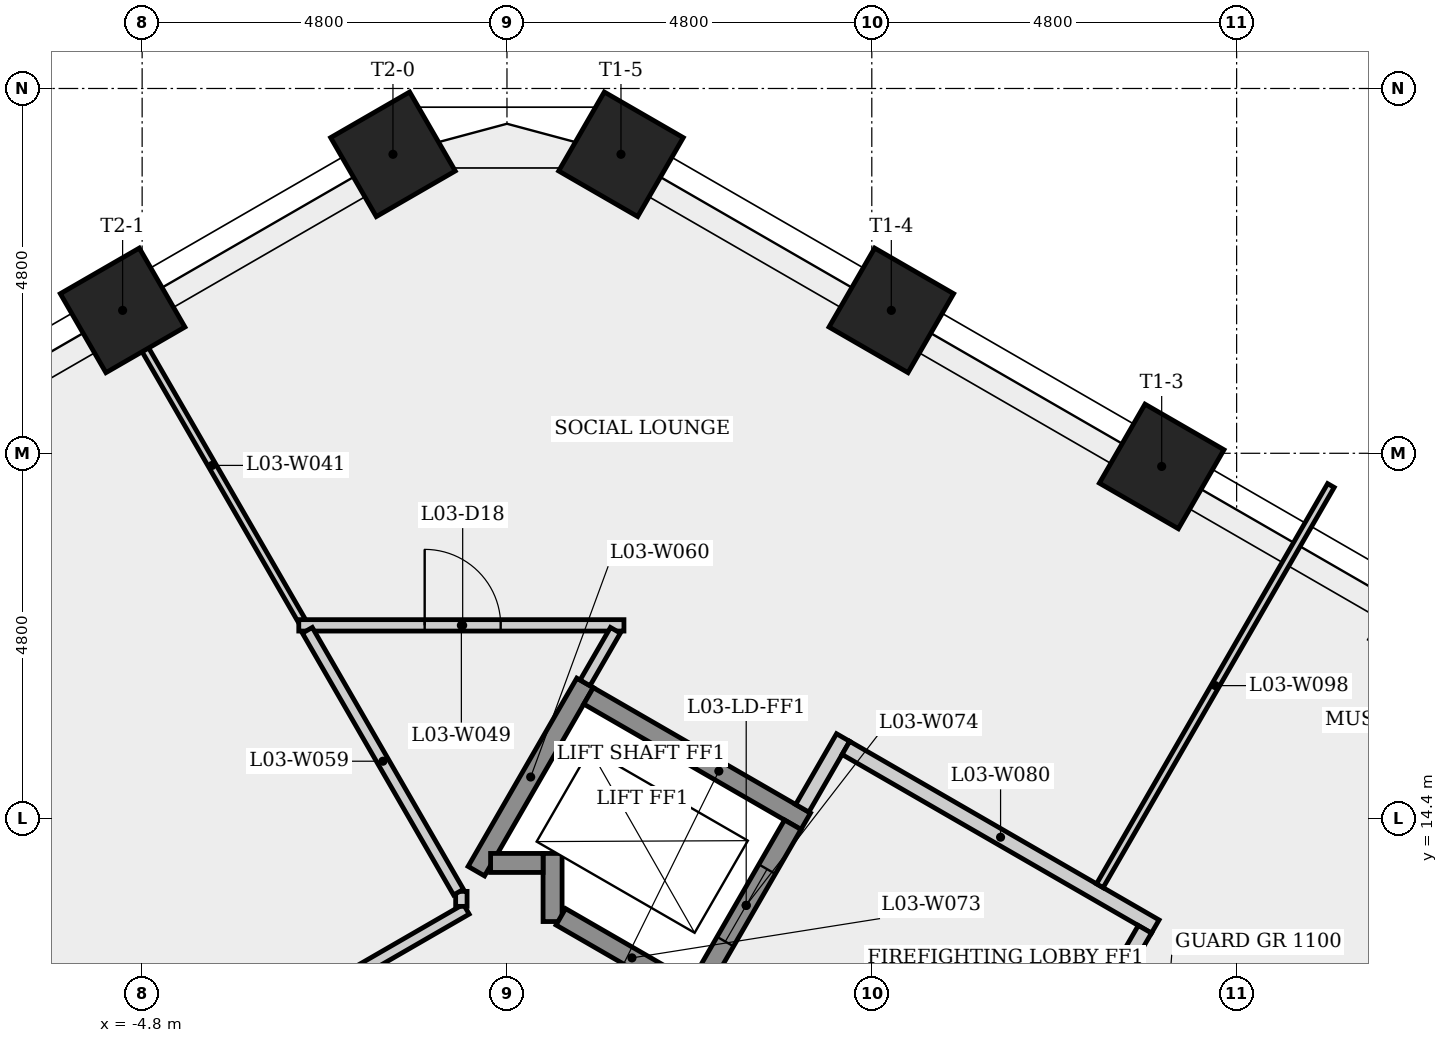
"""IFC4 building model, lengths in metres.
Left out: names, types, materials, properties, quantities, classifications, styles, units other than length and angle.
Written with IfcOpenShell. Run it as: python <this file> out.ifc"""

import sys

from ifc_helpers import new_model, si_unit, direction, frame, frame_2d, origin, origin_2d, place, context, subcontext, project, spatial, rectangle, extrude, element, fill, save


model = new_model("IFC4")
c1 = context("Model", 3, precision=1e-05, world=origin(), true_north=direction((0.0, 1.0)))
c2 = subcontext(c1, "Body", "Model", "MODEL_VIEW")
j1 = project(units=[si_unit("LENGTHUNIT", "METRE"), si_unit("PLANEANGLEUNIT", "RADIAN")], contexts=[c1])
p1 = place(None, origin())
s1 = spatial("IfcSite", under=j1, at=p1, CompositionType="ELEMENT")
p2 = place(p1, origin())
s2 = spatial("IfcBuilding", under=s1, at=p2, CompositionType="ELEMENT")
p3 = place(p2, frame((0.0, 0.0, 16.0)))
s3 = spatial("IfcBuildingStorey", under=s2, at=p3, CompositionType="ELEMENT", Elevation=16.0)
for number, where, z_axis, x_axis in (
    (1, (8.614, 19.027, 0.0), (0.0, 0.0, 1.0), (0.5, 0.866, 0.0)),
    (2, (5.057, 21.08, 0.0), (0.0, 0.0, 1.0), (0.5, 0.866, 0.0)),
    (3, (1.5, 23.134, 0.0), (0.0, 0.0, 1.0), (0.5, 0.866, 0.0)),
    (4, (-1.5, 23.134, 0.0), (0.0, 0.0, 1.0), (-0.5, 0.866, 0.0)),
    (5, (-5.057, 21.08, 0.0), (0.0, 0.0, 1.0), (-0.5, 0.866, 0.0)),
):
    element("IfcColumn", number, at=place(p3, frame(where, z_axis=z_axis, x_axis=x_axis)), inside=s3, PredefinedType="COLUMN", context=c2, shape_type="SweptSolid", body=[
        extrude(rectangle(XDim=1.2, YDim=1.2, at=origin_2d()), origin(), (0.0, 0.0, 1.0), 4.5),
    ])
p4 = place(p3, frame((-10.598, 7.391, 0.0), z_axis=(0.0, 0.0, 1.0), x_axis=(0.866022183431, 0.500005577774, 0.0)))
e6 = element("IfcWall", 6, at=p4, inside=s3, PredefinedType="PARTITIONING", context=c2, shape_type="SweptSolid", body=[
    extrude(rectangle(XDim=11.619, YDim=0.15, at=frame_2d((5.81, 0.0))), origin(), (0.0, 0.0, 1.0), 4.05),
])
p5 = place(p4, frame((5.272, 0.0, 0.0)))
e7 = element("IfcOpeningElement", 7, at=p5, cuts=e6, PredefinedType="OPENING", context=c2, shape_type="SweptSolid", body=[
    extrude(rectangle(XDim=1.0, YDim=2.1, at=frame_2d((0.5, 1.05))), frame((0.0, 0.085, 0.0), z_axis=(0.0, -1.0, 0.0), x_axis=(1.0, 0.0, 0.0)), (0.0, 0.0, 1.0), 0.17),
])
p6 = place(p3, frame((-5.057, 21.08, 0.0), z_axis=(0.0, 0.0, 1.0), x_axis=(0.500018540756, -0.866014699009, 0.0)))
e8 = element("IfcWall", 8, at=p6, inside=s3, PredefinedType="PARTITIONING", context=c2, shape_type="SweptSolid", body=[
    extrude(rectangle(XDim=4.711, YDim=0.1, at=frame_2d((2.355, 0.0))), origin(), (0.0, 0.0, 1.0), 4.05),
])
p7 = place(p3, frame((-2.739, 16.936, 0.0), z_axis=(0.0, 0.0, 1.0), x_axis=(1.0, 0.0, 0.0)))
e9 = element("IfcWall", 9, at=p7, inside=s3, PredefinedType="PARTITIONING", context=c2, shape_type="SweptSolid", body=[
    extrude(rectangle(XDim=4.278, YDim=0.15, at=frame_2d((2.139, 0.0))), origin(), (0.0, 0.0, 1.0), 4.05),
])
p8 = place(p7, frame((1.656, 0.0, 0.0)))
e10 = element("IfcOpeningElement", 10, at=p8, cuts=e9, PredefinedType="OPENING", context=c2, shape_type="SweptSolid", body=[
    extrude(rectangle(XDim=1.0, YDim=2.1, at=frame_2d((0.5, 1.05))), frame((0.0, 0.085, 0.0), z_axis=(0.0, -1.0, 0.0), x_axis=(1.0, 0.0, 0.0)), (0.0, 0.0, 1.0), 0.17),
])
p9 = place(p3, frame((-0.6, 13.239, 0.0), z_axis=(0.0, 0.0, 1.0), x_axis=(0.0, 1.0, 0.0)))
e11 = element("IfcWall", 11, at=p9, inside=s3, PredefinedType="PARTITIONING", context=c2, shape_type="SweptSolid", body=[
    extrude(rectangle(XDim=0.197, YDim=0.15, at=frame_2d((0.099, 0.0))), origin(), (0.0, 0.0, 1.0), 4.05),
])
p10 = place(p3, frame((-0.637, 13.426, 0.0), z_axis=(0.0, 0.0, 1.0), x_axis=(-0.500046503579, 0.865998553266, 0.0)))
e12 = element("IfcWall", 12, at=p10, inside=s3, PredefinedType="PARTITIONING", context=c2, shape_type="SweptSolid", body=[
    extrude(rectangle(XDim=3.978, YDim=0.15, at=frame_2d((1.989, 0.0))), origin(), (0.0, 0.0, 1.0), 4.05),
])
p11 = place(p3, frame((-0.403, 13.702, 0.0), z_axis=(0.0, 0.0, 1.0), x_axis=(0.499976111731, 0.866039195244, 0.0)))
e13 = element("IfcWall", 13, at=p11, inside=s3, PredefinedType="SHEAR", context=c2, shape_type="SweptSolid", body=[
    extrude(rectangle(XDim=2.861, YDim=0.25, at=frame_2d((1.43, 0.0))), origin(), (0.0, 0.0, 1.0), 4.05),
])
p12 = place(p3, frame((0.6, 13.039, 0.0), z_axis=(0.0, 0.0, 1.0), x_axis=(0.0, 1.0, 0.0)))
e14 = element("IfcWall", 14, at=p12, inside=s3, PredefinedType="SHEAR", context=c2, shape_type="SweptSolid", body=[
    extrude(rectangle(XDim=0.896, YDim=0.25, at=frame_2d((0.448, 0.0))), origin(), (0.0, 0.0, 1.0), 4.05),
])
p13 = place(p3, frame((0.475, 13.81, 0.0), z_axis=(0.0, 0.0, 1.0), x_axis=(-1.0, 0.0, 0.0)))
e15 = element("IfcWall", 15, at=p13, inside=s3, PredefinedType="SHEAR", context=c2, shape_type="SweptSolid", body=[
    extrude(rectangle(XDim=0.691, YDim=0.25, at=frame_2d((0.345, 0.0))), origin(), (0.0, 0.0, 1.0), 4.5),
])
p14 = place(p3, frame((1.073, 16.008, 0.0), z_axis=(0.0, 0.0, 1.0), x_axis=(0.866040211805, -0.499974350878, 0.0)))
e16 = element("IfcWall", 16, at=p14, inside=s3, PredefinedType="SHEAR", context=c2, shape_type="SweptSolid", body=[
    extrude(rectangle(XDim=3.3, YDim=0.25, at=frame_2d((1.65, 0.0))), origin(), (0.0, 0.0, 1.0), 4.05),
])
p15 = place(p3, frame((1.427, 16.871, 0.0), z_axis=(0.0, 0.0, 1.0), x_axis=(-0.499951716245, -0.866053278629, 0.0)))
e17 = element("IfcWall", 17, at=p15, inside=s3, PredefinedType="PARTITIONING", context=c2, shape_type="SweptSolid", body=[
    extrude(rectangle(XDim=0.799, YDim=0.15, at=frame_2d((0.399, 0.0))), origin(), (0.0, 0.0, 1.0), 4.05),
])
p16 = place(p3, frame((2.581, 12.02, 0.0), z_axis=(0.0, 0.0, 1.0), x_axis=(-0.86603892542, 0.499976579108, 0.0)))
e18 = element("IfcWall", 18, at=p16, inside=s3, PredefinedType="SHEAR", context=c2, shape_type="SweptSolid", body=[
    extrude(rectangle(XDim=2.162, YDim=0.25, at=frame_2d((1.081, 0.0))), origin(), (0.0, 0.0, 1.0), 4.05),
])
p17 = place(p3, frame((2.535, 12.191, 0.0), z_axis=(0.0, 0.0, 1.0), x_axis=(0.500061746146, 0.865989751695, 0.0)))
e19 = element("IfcWall", 19, at=p17, inside=s3, PredefinedType="SHEAR", context=c2, shape_type="SweptSolid", body=[
    extrude(rectangle(XDim=2.45, YDim=0.25, at=frame_2d((1.225, 0.0))), origin(), (0.0, 0.0, 1.0), 4.5),
])
p18 = place(p17, frame((0.675, 0.0, 0.0)))
e20 = element("IfcOpeningElement", 20, at=p18, cuts=e19, PredefinedType="OPENING", context=c2, shape_type="SweptSolid", body=[
    extrude(rectangle(XDim=1.1, YDim=2.1, at=frame_2d((0.55, 1.05))), frame((0.0, 0.135, 0.0), z_axis=(0.0, -1.0, 0.0), x_axis=(1.0, 0.0, 0.0)), (0.0, 0.0, 1.0), 0.27),
])
p19 = place(p3, frame((3.885, 14.529, 0.0), z_axis=(0.0, 0.0, 1.0), x_axis=(0.499997628298, 0.866026773083, 0.0)))
e21 = element("IfcWall", 21, at=p19, inside=s3, PredefinedType="PARTITIONING", context=c2, shape_type="SweptSolid", body=[
    extrude(rectangle(XDim=1.075, YDim=0.2, at=frame_2d((0.538, 0.0))), origin(), (0.0, 0.0, 1.0), 4.05),
])
p20 = place(p3, frame((4.459, 15.323, 0.0), z_axis=(0.0, 0.0, 1.0), x_axis=(0.866016039709, -0.500016218704, 0.0)))
e22 = element("IfcWall", 22, at=p20, inside=s3, PredefinedType="PARTITIONING", context=c2, shape_type="SweptSolid", body=[
    extrude(rectangle(XDim=4.7, YDim=0.2, at=frame_2d((2.35, 0.0))), origin(), (0.0, 0.0, 1.0), 4.05),
])
p21 = place(p3, frame((6.48, 9.624, 0.0), z_axis=(0.0, 0.0, 1.0), x_axis=(0.500017246033, 0.866015446554, 0.0)))
e23 = element("IfcWall", 23, at=p21, inside=s3, PredefinedType="SHEAR", context=c2, shape_type="SweptSolid", body=[
    extrude(rectangle(XDim=3.25, YDim=0.25, at=frame_2d((1.625, 0.0))), origin(), (0.0, 0.0, 1.0), 4.05),
])
p22 = place(p21, frame((1.125, 0.0, 0.0)))
e24 = element("IfcOpeningElement", 24, at=p22, cuts=e23, PredefinedType="OPENING", context=c2, shape_type="SweptSolid", body=[
    extrude(rectangle(XDim=1.0, YDim=2.1, at=frame_2d((0.5, 1.05))), frame((0.0, 0.135, 0.0), z_axis=(0.0, -1.0, 0.0), x_axis=(1.0, 0.0, 0.0)), (0.0, 0.0, 1.0), 0.27),
])
p23 = place(p3, frame((8.393, 12.937, 0.0), z_axis=(0.0, 0.0, 1.0), x_axis=(-0.500065409566, -0.86598763626, 0.0)))
e25 = element("IfcWall", 25, at=p23, inside=s3, PredefinedType="PARTITIONING", context=c2, shape_type="SweptSolid", body=[
    extrude(rectangle(XDim=0.575, YDim=0.2, at=frame_2d((0.288, 0.0))), origin(), (0.0, 0.0, 1.0), 4.05),
])
p24 = place(p3, frame((10.84, 18.776, 0.0), z_axis=(0.0, 0.0, 1.0), x_axis=(-0.500003976293, -0.866023108059, 0.0)))
e26 = element("IfcWall", 26, at=p24, inside=s3, PredefinedType="PARTITIONING", context=c2, shape_type="SweptSolid", body=[
    extrude(rectangle(XDim=6.081, YDim=0.1, at=frame_2d((3.04, 0.0))), origin(), (0.0, 0.0, 1.0), 4.05),
])
p25 = place(p18, origin())
e27 = element("IfcDoor", 27, at=p25, inside=s3, OperationType="SLIDING_TO_LEFT", PredefinedType="DOOR", context=c2, shape_type="SweptSolid", body=[
    extrude(rectangle(XDim=1.1, YDim=2.1, at=frame_2d((0.55, 1.05))), frame((0.0, 0.025, 0.0), z_axis=(0.0, -1.0, 0.0), x_axis=(1.0, 0.0, 0.0)), (0.0, 0.0, 1.0), 0.05),
])
fill(e20, e27)
p26 = place(p8, origin())
e28 = element("IfcDoor", 28, at=p26, inside=s3, OperationType="SINGLE_SWING_LEFT", PredefinedType="DOOR", context=c2, shape_type="SweptSolid", body=[
    extrude(rectangle(XDim=1.0, YDim=2.1, at=frame_2d((0.5, 1.05))), frame((0.0, 0.025, 0.0), z_axis=(0.0, -1.0, 0.0), x_axis=(1.0, 0.0, 0.0)), (0.0, 0.0, 1.0), 0.05),
])
fill(e10, e28)
save(model, sys.argv[1])
